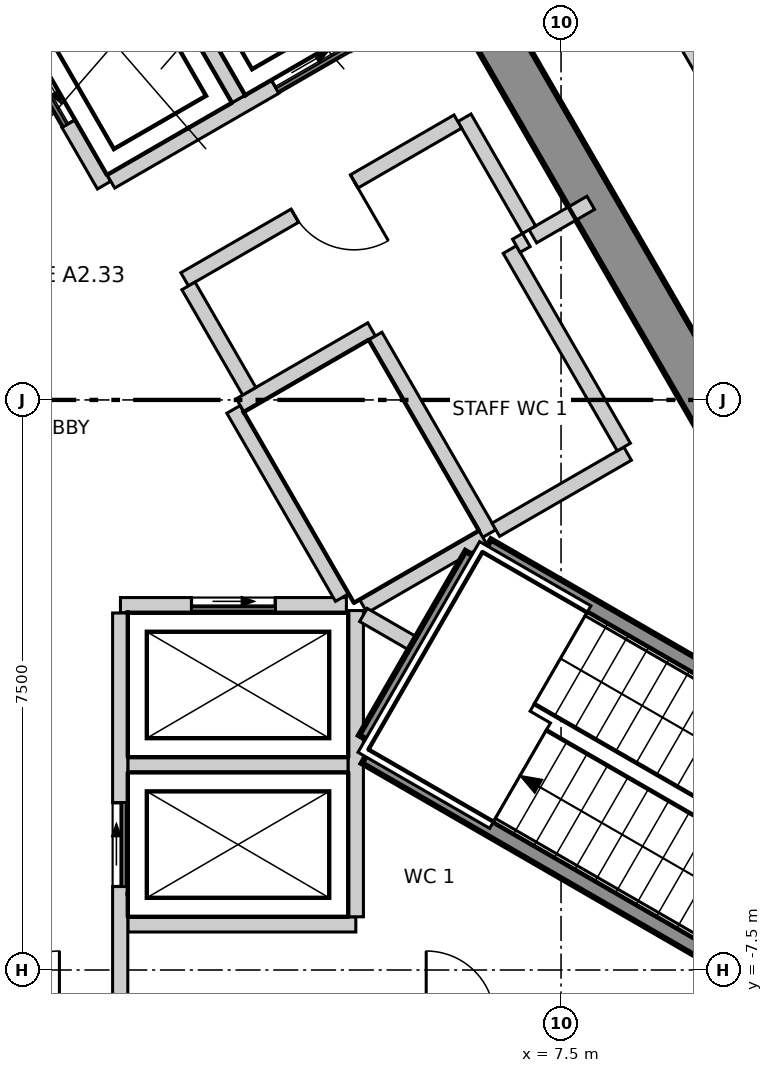
"""IFC4 building model, lengths in metres.
Left out: names, types, materials, properties, quantities, classifications, styles, units other than length and angle.
Written with IfcOpenShell. Run it as: python <this file> out.ifc"""

import sys

from ifc_helpers import new_model, si_unit, direction, frame, frame_2d, origin, place, context, subcontext, project, spatial, polyline, rectangle, outline, extrude, element, fill, save


model = new_model("IFC4")
c1 = context("Model", 3, precision=1e-05, world=origin(), true_north=direction((0.0, 1.0)))
c2 = subcontext(c1, "Body", "Model", "MODEL_VIEW")
j1 = project(units=[si_unit("LENGTHUNIT", "METRE"), si_unit("PLANEANGLEUNIT", "RADIAN")], contexts=[c1])
p1 = place(None, origin())
s1 = spatial("IfcSite", under=j1, at=p1, CompositionType="ELEMENT")
p2 = place(p1, origin())
s2 = spatial("IfcBuilding", under=s1, at=p2, CompositionType="ELEMENT")
p3 = place(p2, frame((0.0, 0.0, 279.1)))
s3 = spatial("IfcBuildingStorey", under=s2, at=p3, CompositionType="ELEMENT", Elevation=279.1)
p4 = place(p3, frame((12.384, -5.15, -0.3), z_axis=(0.0, 0.0, 1.0), x_axis=(-0.500000539815, 0.866025092122, 0.0)))
e1 = element("IfcWall", 1, at=p4, inside=s3, PredefinedType="SHEAR", context=c2, shape_type="SweptSolid", body=[
    extrude(outline(polyline([(-0.173, -0.301), (1.795, -0.301), (3.763, -0.301), (5.731, -0.301), (7.7, -0.301), (9.668, -0.301), (11.636, -0.301), (13.604, -0.3), (15.573, -0.3), (17.541, -0.3), (19.509, -0.3), (21.477, -0.3), (21.131, 0.3), (19.226, 0.3), (17.321, 0.3), (15.415, 0.3), (13.51, 0.3), (11.605, 0.3), (9.699, 0.3), (7.794, 0.3), (5.889, 0.3), (3.984, 0.3), (2.078, 0.3), (0.173, 0.3), (-0.173, -0.301)])), origin(), (0.0, 0.0, 1.0), 3.6),
])
p5 = place(p4, frame((16.378, 0.0, 0.3)))
e2 = element("IfcOpeningElement", 2, at=p5, cuts=e1, PredefinedType="OPENING", context=c2, shape_type="SweptSolid", body=[
    extrude(rectangle(XDim=0.9, YDim=2.1, at=frame_2d((0.45, 1.05))), frame((0.0, 0.31, 0.0), z_axis=(0.0, -1.0, 0.0), x_axis=(1.0, 0.0, 0.0)), (0.0, 0.0, 1.0), 0.621),
])
p6 = place(p4, frame((3.976, 0.0, 0.3)))
e3 = element("IfcOpeningElement", 3, at=p6, cuts=e1, PredefinedType="OPENING", context=c2, shape_type="SweptSolid", body=[
    extrude(rectangle(XDim=1.0, YDim=2.1, at=frame_2d((0.5, 1.05))), frame((0.0, 0.31, 0.0), z_axis=(0.0, -1.0, 0.0), x_axis=(1.0, 0.0, 0.0)), (0.0, 0.0, 1.0), 0.621),
])
p7 = place(p3, frame((25.791, -11.962, 0.0), z_axis=(0.0, 0.0, 1.0), x_axis=(-0.500006870765, 0.86602143691, 0.0)))
e4 = element("IfcWall", 4, at=p7, inside=s3, PredefinedType="ELEMENTEDWALL", context=c2, shape_type="SweptSolid", body=[
    extrude(rectangle(XDim=46.49, YDim=0.2, at=frame_2d((23.245, 0.0))), origin(), (0.0, 0.0, 1.0), 3.3),
])
p8 = place(p7, frame((2.197, 0.0, 0.9)))
e5 = element("IfcOpeningElement", 5, at=p8, cuts=e4, PredefinedType="OPENING", context=c2, shape_type="SweptSolid", body=[
    extrude(rectangle(XDim=3.7, YDim=2.2, at=frame_2d((1.85, 1.1))), frame((0.0, 0.11, 0.0), z_axis=(0.0, -1.0, 0.0), x_axis=(1.0, 0.0, 0.0)), (0.0, 0.0, 1.0), 0.22),
])
p9 = place(p7, frame((7.685, 0.0, 0.9)))
e6 = element("IfcOpeningElement", 6, at=p9, cuts=e4, PredefinedType="OPENING", context=c2, shape_type="SweptSolid", body=[
    extrude(rectangle(XDim=3.7, YDim=2.2, at=frame_2d((1.85, 1.1))), frame((0.0, 0.11, 0.0), z_axis=(0.0, -1.0, 0.0), x_axis=(1.0, 0.0, 0.0)), (0.0, 0.0, 1.0), 0.22),
])
p10 = place(p7, frame((13.173, 0.0, 0.9)))
e7 = element("IfcOpeningElement", 7, at=p10, cuts=e4, PredefinedType="OPENING", context=c2, shape_type="SweptSolid", body=[
    extrude(rectangle(XDim=3.7, YDim=2.2, at=frame_2d((1.85, 1.1))), frame((0.0, 0.11, 0.0), z_axis=(0.0, -1.0, 0.0), x_axis=(1.0, 0.0, 0.0)), (0.0, 0.0, 1.0), 0.22),
])
p11 = place(p7, frame((18.661, 0.0, 0.9)))
e8 = element("IfcOpeningElement", 8, at=p11, cuts=e4, PredefinedType="OPENING", context=c2, shape_type="SweptSolid", body=[
    extrude(rectangle(XDim=3.7, YDim=2.2, at=frame_2d((1.85, 1.1))), frame((0.0, 0.11, 0.0), z_axis=(0.0, -1.0, 0.0), x_axis=(1.0, 0.0, 0.0)), (0.0, 0.0, 1.0), 0.22),
])
p12 = place(p7, frame((24.149, 0.0, 0.9)))
e9 = element("IfcOpeningElement", 9, at=p12, cuts=e4, PredefinedType="OPENING", context=c2, shape_type="SweptSolid", body=[
    extrude(rectangle(XDim=3.7, YDim=2.2, at=frame_2d((1.85, 1.1))), frame((0.0, 0.11, 0.0), z_axis=(0.0, -1.0, 0.0), x_axis=(1.0, 0.0, 0.0)), (0.0, 0.0, 1.0), 0.22),
])
p13 = place(p7, frame((29.637, 0.0, 0.9)))
e10 = element("IfcOpeningElement", 10, at=p13, cuts=e4, PredefinedType="OPENING", context=c2, shape_type="SweptSolid", body=[
    extrude(rectangle(XDim=3.7, YDim=2.2, at=frame_2d((1.85, 1.1))), frame((0.0, 0.11, 0.0), z_axis=(0.0, -1.0, 0.0), x_axis=(1.0, 0.0, 0.0)), (0.0, 0.0, 1.0), 0.22),
])
p14 = place(p7, frame((35.125, 0.0, 0.9)))
e11 = element("IfcOpeningElement", 11, at=p14, cuts=e4, PredefinedType="OPENING", context=c2, shape_type="SweptSolid", body=[
    extrude(rectangle(XDim=3.7, YDim=2.2, at=frame_2d((1.85, 1.1))), frame((0.0, 0.11, 0.0), z_axis=(0.0, -1.0, 0.0), x_axis=(1.0, 0.0, 0.0)), (0.0, 0.0, 1.0), 0.22),
])
p15 = place(p7, frame((40.613, 0.0, 0.9)))
e12 = element("IfcOpeningElement", 12, at=p15, cuts=e4, PredefinedType="OPENING", context=c2, shape_type="SweptSolid", body=[
    extrude(rectangle(XDim=3.7, YDim=2.2, at=frame_2d((1.85, 1.1))), frame((0.0, 0.11, 0.0), z_axis=(0.0, -1.0, 0.0), x_axis=(1.0, 0.0, 0.0)), (0.0, 0.0, 1.0), 0.22),
])
p16 = place(p3, frame((0.075, 20.37, 0.0), z_axis=(0.0, 0.0, 1.0), x_axis=(0.500003985697, -0.866023102629, 0.0)))
e13 = element("IfcWall", 13, at=p16, inside=s3, PredefinedType="PARTITIONING", context=c2, shape_type="SweptSolid", body=[
    extrude(rectangle(XDim=35.206, YDim=0.15, at=frame_2d((17.603, 0.0))), origin(), (0.0, 0.0, 1.0), 3.3),
])
p17 = place(p16, frame((31.506, 0.0, 0.0)))
e14 = element("IfcOpeningElement", 14, at=p17, cuts=e13, PredefinedType="OPENING", context=c2, shape_type="SweptSolid", body=[
    extrude(rectangle(XDim=1.0, YDim=2.1, at=frame_2d((0.5, 1.05))), frame((0.0, 0.085, 0.0), z_axis=(0.0, -1.0, 0.0), x_axis=(1.0, 0.0, 0.0)), (0.0, 0.0, 1.0), 0.17),
])
p18 = place(p16, frame((26.529, 0.0, 0.0)))
e15 = element("IfcOpeningElement", 15, at=p18, cuts=e13, PredefinedType="OPENING", context=c2, shape_type="SweptSolid", body=[
    extrude(rectangle(XDim=1.0, YDim=2.1, at=frame_2d((0.5, 1.05))), frame((0.0, 0.085, 0.0), z_axis=(0.0, -1.0, 0.0), x_axis=(1.0, 0.0, 0.0)), (0.0, 0.0, 1.0), 0.17),
])
p19 = place(p16, frame((19.442, 0.0, 0.0)))
e16 = element("IfcOpeningElement", 16, at=p19, cuts=e13, PredefinedType="OPENING", context=c2, shape_type="SweptSolid", body=[
    extrude(rectangle(XDim=1.0, YDim=2.1, at=frame_2d((0.5, 1.05))), frame((0.0, 0.085, 0.0), z_axis=(0.0, -1.0, 0.0), x_axis=(1.0, 0.0, 0.0)), (0.0, 0.0, 1.0), 0.17),
])
p20 = place(p16, frame((8.254, 0.0, 0.0)))
e17 = element("IfcOpeningElement", 17, at=p20, cuts=e13, PredefinedType="OPENING", context=c2, shape_type="SweptSolid", body=[
    extrude(rectangle(XDim=1.0, YDim=2.1, at=frame_2d((0.5, 1.05))), frame((0.0, 0.085, 0.0), z_axis=(0.0, -1.0, 0.0), x_axis=(1.0, 0.0, 0.0)), (0.0, 0.0, 1.0), 0.17),
])
p21 = place(p16, frame((13.754, 0.0, 0.0)))
e18 = element("IfcOpeningElement", 18, at=p21, cuts=e13, PredefinedType="OPENING", context=c2, shape_type="SweptSolid", body=[
    extrude(rectangle(XDim=0.9, YDim=2.1, at=frame_2d((0.45, 1.05))), frame((0.0, 0.085, 0.0), z_axis=(0.0, -1.0, 0.0), x_axis=(1.0, 0.0, 0.0)), (0.0, 0.0, 1.0), 0.17),
])
p22 = place(p16, frame((11.554, 0.0, 0.0)))
e19 = element("IfcOpeningElement", 19, at=p22, cuts=e13, PredefinedType="OPENING", context=c2, shape_type="SweptSolid", body=[
    extrude(rectangle(XDim=0.9, YDim=2.1, at=frame_2d((0.45, 1.05))), frame((0.0, 0.085, 0.0), z_axis=(0.0, -1.0, 0.0), x_axis=(1.0, 0.0, 0.0)), (0.0, 0.0, 1.0), 0.17),
])
p23 = place(p16, frame((2.777, 0.0, 0.0)))
e20 = element("IfcOpeningElement", 20, at=p23, cuts=e13, PredefinedType="OPENING", context=c2, shape_type="SweptSolid", body=[
    extrude(rectangle(XDim=1.0, YDim=2.1, at=frame_2d((0.5, 1.05))), frame((0.0, 0.085, 0.0), z_axis=(0.0, -1.0, 0.0), x_axis=(1.0, 0.0, 0.0)), (0.0, 0.0, 1.0), 0.17),
])
p24 = place(p3, frame((1.8, -4.8, 0.0), z_axis=(0.0, 0.0, 1.0), x_axis=(1.0, 0.0, 0.0)))
e21 = element("IfcWall", 21, at=p24, inside=s3, PredefinedType="SOLIDWALL", context=c2, shape_type="SweptSolid", body=[
    extrude(rectangle(XDim=2.9, YDim=0.2, at=frame_2d((1.45, 0.0))), origin(), (0.0, 0.0, 1.0), 3.3),
])
p25 = place(p3, frame((1.8, -6.9, 0.0), z_axis=(0.0, 0.0, 1.0), x_axis=(1.0, 0.0, 0.0)))
e22 = element("IfcWall", 22, at=p25, inside=s3, PredefinedType="SOLIDWALL", context=c2, shape_type="SweptSolid", body=[
    extrude(rectangle(XDim=3.0, YDim=0.2, at=frame_2d((1.5, 0.0))), origin(), (0.0, 0.0, 1.0), 3.3),
])
p26 = place(p3, frame((1.703, -2.7, 0.0), z_axis=(0.0, 0.0, 1.0), x_axis=(1.0, 0.0, 0.0)))
e23 = element("IfcWall", 23, at=p26, inside=s3, PredefinedType="SOLIDWALL", context=c2, shape_type="SweptSolid", body=[
    extrude(rectangle(XDim=2.973, YDim=0.2, at=frame_2d((1.487, 0.0))), origin(), (0.0, 0.0, 1.0), 3.3),
])
p27 = place(p26, frame((0.936, 0.0, 0.0)))
e24 = element("IfcOpeningElement", 24, at=p27, cuts=e23, PredefinedType="OPENING", context=c2, shape_type="SweptSolid", body=[
    extrude(rectangle(XDim=1.1, YDim=2.1, at=frame_2d((0.55, 1.05))), frame((0.0, 0.11, 0.0), z_axis=(0.0, -1.0, 0.0), x_axis=(1.0, 0.0, 0.0)), (0.0, 0.0, 1.0), 0.22),
])
p28 = place(p3, frame((0.0, 5.4, 0.0), z_axis=(0.0, 0.0, 1.0), x_axis=(0.500103862429, -0.865965430478, 0.0)))
e25 = element("IfcWall", 25, at=p28, inside=s3, PredefinedType="SOLIDWALL", context=c2, shape_type="SweptSolid", body=[
    extrude(rectangle(XDim=2.973, YDim=0.2, at=frame_2d((1.487, 0.0))), origin(), (0.0, 0.0, 1.0), 3.3),
])
p29 = place(p28, frame((0.937, 0.0, 0.0)))
e26 = element("IfcOpeningElement", 26, at=p29, cuts=e25, PredefinedType="OPENING", context=c2, shape_type="SweptSolid", body=[
    extrude(rectangle(XDim=1.1, YDim=2.1, at=frame_2d((0.55, 1.05))), frame((0.0, 0.11, 0.0), z_axis=(0.0, -1.0, 0.0), x_axis=(1.0, 0.0, 0.0)), (0.0, 0.0, 1.0), 0.22),
])
p30 = place(p3, frame((3.19, -0.125, 0.0), z_axis=(0.0, 0.0, 1.0), x_axis=(0.499988658015, -0.866031951983, 0.0)))
e27 = element("IfcWall", 27, at=p30, inside=s3, PredefinedType="SOLIDWALL", context=c2, shape_type="SweptSolid", body=[
    extrude(rectangle(XDim=2.858, YDim=0.2, at=frame_2d((1.429, 0.0))), origin(), (0.0, 0.0, 1.0), 3.3),
])
p31 = place(p3, frame((1.578, 2.874, 0.0), z_axis=(0.0, 0.0, 1.0), x_axis=(0.866045911672, 0.499964477614, 0.0)))
e28 = element("IfcWall", 28, at=p31, inside=s3, PredefinedType="SOLIDWALL", context=c2, shape_type="SweptSolid", body=[
    extrude(rectangle(XDim=5.327, YDim=0.2, at=frame_2d((2.663, 0.0))), origin(), (0.0, 0.0, 1.0), 3.3),
])
p32 = place(p31, frame((2.496, 0.0, 0.0)))
e29 = element("IfcOpeningElement", 29, at=p32, cuts=e28, PredefinedType="OPENING", context=c2, shape_type="SweptSolid", body=[
    extrude(rectangle(XDim=1.1, YDim=2.1, at=frame_2d((0.55, 1.05))), frame((0.0, 0.11, 0.0), z_axis=(0.0, -1.0, 0.0), x_axis=(1.0, 0.0, 0.0)), (0.0, 0.0, 1.0), 0.22),
])
p33 = place(p3, frame((1.7, -8.13, 0.0), z_axis=(0.0, 0.0, 1.0), x_axis=(0.0, 1.0, 0.0)))
e30 = element("IfcWall", 30, at=p33, inside=s3, PredefinedType="SOLIDWALL", context=c2, shape_type="SweptSolid", body=[
    extrude(rectangle(XDim=5.327, YDim=0.2, at=frame_2d((2.664, 0.0))), origin(), (0.0, 0.0, 1.0), 3.3),
])
p34 = place(p33, frame((1.73, 0.0, 0.0)))
e31 = element("IfcOpeningElement", 31, at=p34, cuts=e30, PredefinedType="OPENING", context=c2, shape_type="SweptSolid", body=[
    extrude(rectangle(XDim=1.1, YDim=2.1, at=frame_2d((0.55, 1.05))), frame((0.0, 0.11, 0.0), z_axis=(0.0, -1.0, 0.0), x_axis=(1.0, 0.0, 0.0)), (0.0, 0.0, 1.0), 0.22),
])
p35 = place(p3, frame((4.8, -6.8, 0.0), z_axis=(0.0, 0.0, 1.0), x_axis=(0.0, 1.0, 0.0)))
e32 = element("IfcWall", 32, at=p35, inside=s3, PredefinedType="SOLIDWALL", context=c2, shape_type="SweptSolid", body=[
    extrude(rectangle(XDim=4.029, YDim=0.2, at=frame_2d((2.015, 0.0))), origin(), (0.0, 0.0, 1.0), 3.3),
])
p36 = place(p3, frame((3.278, -0.071, 0.0), z_axis=(0.0, 0.0, 1.0), x_axis=(0.865855657918, 0.500293893279, 0.0)))
e33 = element("IfcWall", 33, at=p36, inside=s3, PredefinedType="SOLIDWALL", context=c2, shape_type="SweptSolid", body=[
    extrude(rectangle(XDim=1.997, YDim=0.2, at=frame_2d((0.999, 0.0))), origin(), (0.0, 0.0, 1.0), 3.3),
])
p37 = place(p3, frame((7.129, 2.153, 0.0), z_axis=(0.0, 0.0, 1.0), x_axis=(0.866083962871, 0.499898558967, 0.0)))
e34 = element("IfcWall", 34, at=p37, inside=s3, PredefinedType="SOLIDWALL", context=c2, shape_type="SweptSolid", body=[
    extrude(rectangle(XDim=0.88, YDim=0.2, at=frame_2d((0.44, 0.0))), origin(), (0.0, 0.0, 1.0), 3.3),
])
p38 = place(p3, frame((1.807, 6.47, 0.0), z_axis=(0.0, 0.0, 1.0), x_axis=(0.50012328804, -0.865954211699, 0.0)))
e35 = element("IfcWall", 35, at=p38, inside=s3, PredefinedType="SOLIDWALL", context=c2, shape_type="SweptSolid", body=[
    extrude(rectangle(XDim=2.9, YDim=0.2, at=frame_2d((1.45, 0.0))), origin(), (0.0, 0.0, 1.0), 3.3),
])
p39 = place(p3, frame((5.057, 0.841, 0.0), z_axis=(0.0, 0.0, 1.0), x_axis=(0.499990139034, -0.866031096941, 0.0)))
e36 = element("IfcWall", 36, at=p39, inside=s3, PredefinedType="SOLIDWALL", context=c2, shape_type="SweptSolid", body=[
    extrude(rectangle(XDim=3.0, YDim=0.2, at=frame_2d((1.5, 0.0))), origin(), (0.0, 0.0, 1.0), 3.3),
])
p40 = place(p3, frame((4.9, -2.714, 0.0), z_axis=(0.0, 0.0, 1.0), x_axis=(0.865846928409, 0.500309001083, 0.0)))
e37 = element("IfcWall", 37, at=p40, inside=s3, PredefinedType="SOLIDWALL", context=c2, shape_type="SweptSolid", body=[
    extrude(rectangle(XDim=1.813, YDim=0.2, at=frame_2d((0.907, 0.0))), origin(), (0.0, 0.0, 1.0), 3.3),
])
p41 = place(p3, frame((6.229, 3.712, 0.0), z_axis=(0.0, 0.0, 1.0), x_axis=(0.499875724984, -0.86609714211, 0.0)))
e38 = element("IfcWall", 38, at=p41, inside=s3, PredefinedType="SOLIDWALL", context=c2, shape_type="SweptSolid", body=[
    extrude(rectangle(XDim=1.701, YDim=0.2, at=frame_2d((0.85, 0.0))), origin(), (0.0, 0.0, 1.0), 3.3),
])
p42 = place(p3, frame((2.548, 1.587, 0.0), z_axis=(0.0, 0.0, 1.0), x_axis=(0.866004344652, 0.500036473714, 0.0)))
e39 = element("IfcWall", 39, at=p42, inside=s3, PredefinedType="SOLIDWALL", context=c2, shape_type="SweptSolid", body=[
    extrude(rectangle(XDim=4.15, YDim=0.2, at=frame_2d((2.075, 0.0))), origin(), (0.0, 0.0, 1.0), 3.3),
])
p43 = place(p42, frame((1.675, 0.0, 0.0)))
e40 = element("IfcOpeningElement", 40, at=p43, cuts=e39, PredefinedType="OPENING", context=c2, shape_type="SweptSolid", body=[
    extrude(rectangle(XDim=0.9, YDim=2.1, at=frame_2d((0.45, 1.05))), frame((0.0, 0.11, 0.0), z_axis=(0.0, -1.0, 0.0), x_axis=(1.0, 0.0, 0.0)), (0.0, 0.0, 1.0), 0.22),
])
p44 = place(p3, frame((2.598, 1.5, 0.0), z_axis=(0.0, 0.0, 1.0), x_axis=(0.499929347863, -0.866066190972, 0.0)))
e41 = element("IfcWall", 41, at=p44, inside=s3, PredefinedType="SOLIDWALL", context=c2, shape_type="SweptSolid", body=[
    extrude(rectangle(XDim=1.6, YDim=0.2, at=frame_2d((0.8, 0.0))), origin(), (0.0, 0.0, 1.0), 3.3),
])
p45 = place(p3, frame((4.9, -2.829, 0.0), z_axis=(0.0, 0.0, 1.0), x_axis=(0.866273177064, -0.499570598314, 0.0)))
e42 = element("IfcWall", 42, at=p45, inside=s3, PredefinedType="SOLIDWALL", context=c2, shape_type="SweptSolid", body=[
    extrude(rectangle(XDim=0.742, YDim=0.2, at=frame_2d((0.371, 0.0))), origin(), (0.0, 0.0, 1.0), 3.3),
])
p46 = place(p3, frame((6.642, -1.708, 0.0), z_axis=(0.0, 0.0, 1.0), x_axis=(0.866043441391, 0.499968756647, 0.0)))
e43 = element("IfcWall", 43, at=p46, inside=s3, PredefinedType="SOLIDWALL", context=c2, shape_type="SweptSolid", body=[
    extrude(rectangle(XDim=2.002, YDim=0.2, at=frame_2d((1.001, 0.0))), origin(), (0.0, 0.0, 1.0), 3.3),
])
p47 = place(p3, frame((6.826, 1.978, 0.0), z_axis=(0.0, 0.0, 1.0), x_axis=(0.499990139034, -0.866031096941, 0.0)))
e44 = element("IfcWall", 44, at=p47, inside=s3, PredefinedType="SOLIDWALL", context=c2, shape_type="SweptSolid", body=[
    extrude(rectangle(XDim=3.0, YDim=0.2, at=frame_2d((1.5, 0.0))), origin(), (0.0, 0.0, 1.0), 3.3),
])
p48 = place(p3, frame((6.912, 2.028, 0.0), z_axis=(0.0, 0.0, 1.0), x_axis=(0.866559367082, 0.499074005857, 0.0)))
e45 = element("IfcWall", 45, at=p48, inside=s3, PredefinedType="SOLIDWALL", context=c2, shape_type="SweptSolid", body=[
    extrude(rectangle(XDim=0.152, YDim=0.2, at=frame_2d((0.076, 0.0))), origin(), (0.0, 0.0, 1.0), 3.3),
])
p49 = place(p3, frame((4.929, -4.462, 0.0), z_axis=(0.0, 0.0, 1.0), x_axis=(0.500200581029, 0.865909567298, 0.0)))
e46 = element("IfcWall", 46, at=p49, inside=s3, PredefinedType="SOLIDWALL", context=c2, shape_type="SweptSolid", body=[
    extrude(rectangle(XDim=2.799, YDim=0.2, at=frame_2d((1.399, 0.0))), origin(), (0.0, 0.0, 1.0), 3.3),
])
p50 = place(p3, frame((6.529, -1.922, 0.0), z_axis=(0.0, 0.0, 1.0), x_axis=(0.866068467981, -0.499925403204, 0.0)))
e47 = element("IfcWall", 47, at=p50, inside=s3, PredefinedType="SOLIDWALL", context=c2, shape_type="SweptSolid", body=[
    extrude(rectangle(XDim=6.665, YDim=0.2, at=frame_2d((3.332, 0.0))), origin(), (0.0, 0.0, 1.0), 3.3),
])
p51 = place(p3, frame((4.929, -4.693, 0.0), z_axis=(0.0, 0.0, 1.0), x_axis=(0.866005022404, -0.500035299925, 0.0)))
e48 = element("IfcWall", 48, at=p51, inside=s3, PredefinedType="SOLIDWALL", context=c2, shape_type="SweptSolid", body=[
    extrude(rectangle(XDim=6.665, YDim=0.2, at=frame_2d((3.333, 0.0))), origin(), (0.0, 0.0, 1.0), 3.3),
])
p52 = place(p27, origin())
e49 = element("IfcDoor", 49, at=p52, inside=s3, OperationType="SLIDING_TO_LEFT", PredefinedType="DOOR", context=c2, shape_type="SweptSolid", body=[
    extrude(rectangle(XDim=1.1, YDim=2.1, at=frame_2d((0.55, 1.05))), frame((0.0, 0.025, 0.0), z_axis=(0.0, -1.0, 0.0), x_axis=(1.0, 0.0, 0.0)), (0.0, 0.0, 1.0), 0.05),
])
fill(e24, e49)
p53 = place(p34, origin())
e50 = element("IfcDoor", 50, at=p53, inside=s3, OperationType="SLIDING_TO_LEFT", PredefinedType="DOOR", context=c2, shape_type="SweptSolid", body=[
    extrude(rectangle(XDim=1.1, YDim=2.1, at=frame_2d((0.55, 1.05))), frame((0.0, 0.025, 0.0), z_axis=(0.0, -1.0, 0.0), x_axis=(1.0, 0.0, 0.0)), (0.0, 0.0, 1.0), 0.05),
])
fill(e31, e50)
p54 = place(p29, origin())
e51 = element("IfcDoor", 51, at=p54, inside=s3, OperationType="SLIDING_TO_LEFT", PredefinedType="DOOR", context=c2, shape_type="SweptSolid", body=[
    extrude(rectangle(XDim=1.1, YDim=2.1, at=frame_2d((0.55, 1.05))), frame((0.0, 0.025, 0.0), z_axis=(0.0, -1.0, 0.0), x_axis=(1.0, 0.0, 0.0)), (0.0, 0.0, 1.0), 0.05),
])
fill(e26, e51)
p55 = place(p32, origin())
e52 = element("IfcDoor", 52, at=p55, inside=s3, OperationType="SLIDING_TO_LEFT", PredefinedType="DOOR", context=c2, shape_type="SweptSolid", body=[
    extrude(rectangle(XDim=1.1, YDim=2.1, at=frame_2d((0.55, 1.05))), frame((0.0, 0.025, 0.0), z_axis=(0.0, -1.0, 0.0), x_axis=(1.0, 0.0, 0.0)), (0.0, 0.0, 1.0), 0.05),
])
fill(e29, e52)
p56 = place(p43, origin())
e53 = element("IfcDoor", 53, at=p56, inside=s3, OperationType="SINGLE_SWING_RIGHT", PredefinedType="DOOR", context=c2, shape_type="SweptSolid", body=[
    extrude(rectangle(XDim=0.9, YDim=2.1, at=frame_2d((0.45, 1.05))), frame((0.0, 0.025, 0.0), z_axis=(0.0, -1.0, 0.0), x_axis=(1.0, 0.0, 0.0)), (0.0, 0.0, 1.0), 0.05),
])
fill(e40, e53)
save(model, sys.argv[1])
